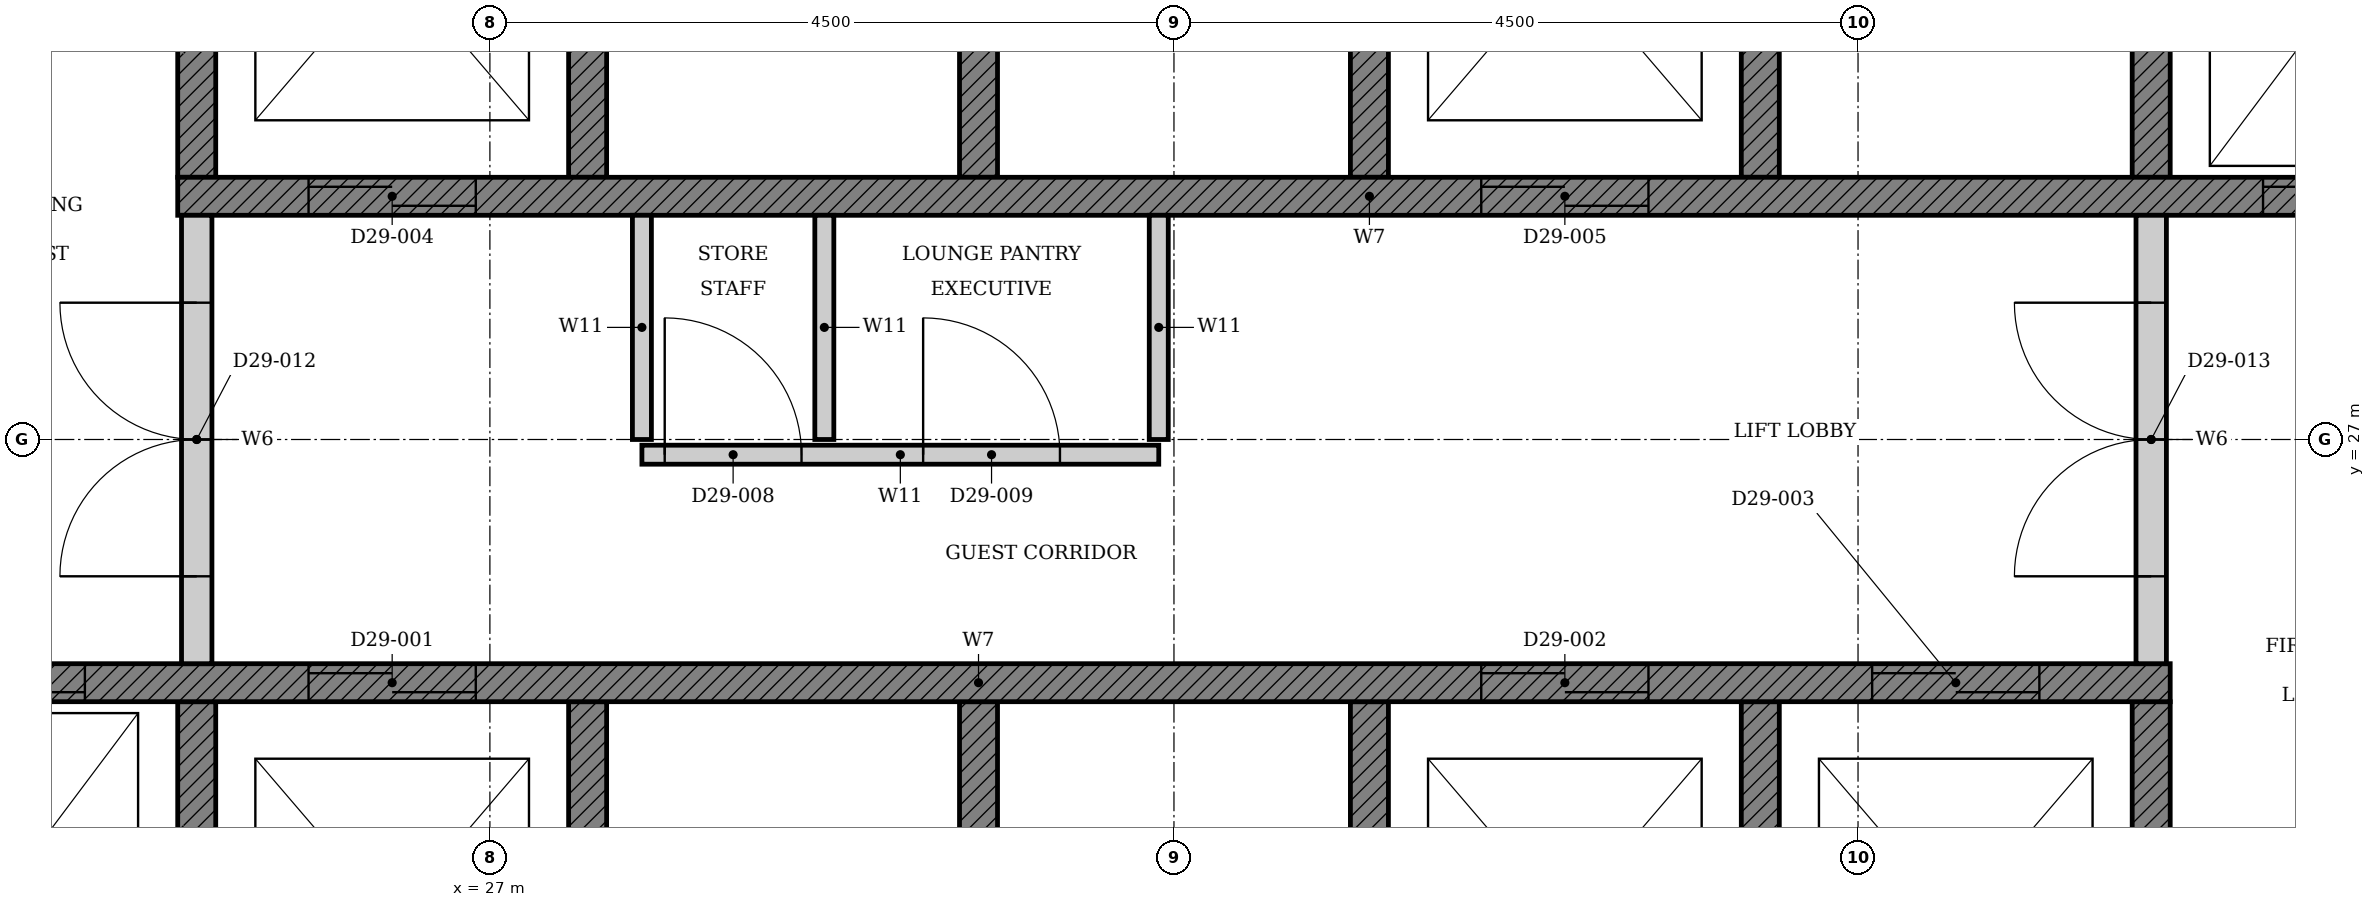
"""IFC4 building model, lengths in metres.
Left out: names, types, materials, properties, quantities, classifications, styles, units other than length and angle.
Written with IfcOpenShell. Run it as: python <this file> out.ifc"""

import sys

from ifc_helpers import new_model, si_unit, direction, frame, frame_2d, origin, place, context, subcontext, project, spatial, polyline, rectangle, outline, extrude, element, fill, save


model = new_model("IFC4")
c1 = context("Model", 3, precision=1e-05, world=origin(), true_north=direction((0.0, 1.0)))
c2 = subcontext(c1, "Body", "Model", "MODEL_VIEW")
j1 = project(units=[si_unit("LENGTHUNIT", "METRE"), si_unit("PLANEANGLEUNIT", "RADIAN")], contexts=[c1])
p1 = place(None, origin())
s1 = spatial("IfcSite", under=j1, at=p1, CompositionType="ELEMENT")
p2 = place(p1, origin())
s2 = spatial("IfcBuilding", under=s1, at=p2, CompositionType="ELEMENT")
p3 = place(p2, frame((0.0, 0.0, 118.8)))
s3 = spatial("IfcBuildingStorey", under=s2, at=p3, CompositionType="ELEMENT", Elevation=118.8)
p4 = place(p3, origin())
e1 = element("IfcWall", 1, at=p4, inside=s3, PredefinedType="SHEAR", context=c2, shape_type="SweptSolid", body=[
    extrude(outline(polyline([(22.375, 22.35), (38.053, 22.35), (38.053, 25.275), (37.803, 25.275), (37.803, 22.65), (35.482, 22.65), (35.482, 25.275), (35.232, 25.275), (35.232, 22.65), (32.911, 22.65), (32.911, 25.275), (32.661, 25.275), (32.661, 22.65), (30.339, 22.65), (30.339, 25.275), (30.089, 25.275), (30.089, 22.65), (27.768, 22.65), (27.768, 25.275), (27.518, 25.275), (27.518, 22.65), (25.197, 22.65), (25.197, 25.275), (24.947, 25.275), (24.947, 22.65), (22.625, 22.65), (22.625, 25.275), (22.375, 25.275), (22.375, 22.35)])), origin(), (0.0, 0.0, 1.0), 3.3),
])
p5 = place(p3, origin())
e2 = element("IfcWall", 2, at=p5, inside=s3, PredefinedType="SHEAR", context=c2, shape_type="SweptSolid", body=[
    extrude(outline(polyline([(24.947, 28.725), (25.197, 28.725), (25.197, 31.35), (27.518, 31.35), (27.518, 28.725), (27.768, 28.725), (27.768, 31.35), (30.089, 31.35), (30.089, 28.725), (30.339, 28.725), (30.339, 31.35), (32.661, 31.35), (32.661, 28.725), (32.911, 28.725), (32.911, 31.35), (35.232, 31.35), (35.232, 28.725), (35.482, 28.725), (35.482, 31.35), (37.803, 31.35), (37.803, 28.725), (38.053, 28.725), (38.053, 31.35), (40.375, 31.35), (40.375, 28.725), (40.625, 28.725), (40.625, 31.65), (24.947, 31.65), (24.947, 28.725)])), origin(), (0.0, 0.0, 1.0), 3.3),
])
p6 = place(p3, frame((22.375, 25.4, 0.0), z_axis=(0.0, 0.0, 1.0), x_axis=(1.0, 0.0, 0.0)))
e3 = element("IfcWall", 3, at=p6, inside=s3, PredefinedType="SHEAR", context=c2, shape_type="SweptSolid", body=[
    extrude(rectangle(XDim=15.678, YDim=0.25, at=frame_2d((7.839, 0.0))), origin(), (0.0, 0.0, 1.0), 3.3),
])
p7 = place(p6, frame((3.432, 0.0, 0.0)))
e4 = element("IfcOpeningElement", 4, at=p7, cuts=e3, PredefinedType="OPENING", context=c2, shape_type="SweptSolid", body=[
    extrude(rectangle(XDim=1.1, YDim=2.1, at=frame_2d((0.55, 1.05))), frame((0.0, 0.135, 0.0), z_axis=(0.0, -1.0, 0.0), x_axis=(1.0, 0.0, 0.0)), (0.0, 0.0, 1.0), 0.27),
])
p8 = place(p6, frame((11.146, 0.0, 0.0)))
e5 = element("IfcOpeningElement", 5, at=p8, cuts=e3, PredefinedType="OPENING", context=c2, shape_type="SweptSolid", body=[
    extrude(rectangle(XDim=1.1, YDim=2.1, at=frame_2d((0.55, 1.05))), frame((0.0, 0.135, 0.0), z_axis=(0.0, -1.0, 0.0), x_axis=(1.0, 0.0, 0.0)), (0.0, 0.0, 1.0), 0.27),
])
p9 = place(p6, frame((13.718, 0.0, 0.0)))
e6 = element("IfcOpeningElement", 6, at=p9, cuts=e3, PredefinedType="OPENING", context=c2, shape_type="SweptSolid", body=[
    extrude(rectangle(XDim=1.1, YDim=2.1, at=frame_2d((0.55, 1.05))), frame((0.0, 0.135, 0.0), z_axis=(0.0, -1.0, 0.0), x_axis=(1.0, 0.0, 0.0)), (0.0, 0.0, 1.0), 0.27),
])
p10 = place(p6, frame((0.861, 0.0, 0.0)))
e7 = element("IfcOpeningElement", 7, at=p10, cuts=e3, PredefinedType="OPENING", context=c2, shape_type="SweptSolid", body=[
    extrude(rectangle(XDim=1.1, YDim=2.1, at=frame_2d((0.55, 1.05))), frame((0.0, 0.135, 0.0), z_axis=(0.0, -1.0, 0.0), x_axis=(1.0, 0.0, 0.0)), (0.0, 0.0, 1.0), 0.27),
])
p11 = place(p3, frame((24.947, 28.6, 0.0), z_axis=(0.0, 0.0, 1.0), x_axis=(1.0, 0.0, 0.0)))
e8 = element("IfcWall", 8, at=p11, inside=s3, PredefinedType="SHEAR", context=c2, shape_type="SweptSolid", body=[
    extrude(rectangle(XDim=15.678, YDim=0.25, at=frame_2d((7.839, 0.0))), origin(), (0.0, 0.0, 1.0), 3.3),
])
p12 = place(p11, frame((0.861, 0.0, 0.0)))
e9 = element("IfcOpeningElement", 9, at=p12, cuts=e8, PredefinedType="OPENING", context=c2, shape_type="SweptSolid", body=[
    extrude(rectangle(XDim=1.1, YDim=2.1, at=frame_2d((0.55, 1.05))), frame((0.0, 0.135, 0.0), z_axis=(0.0, -1.0, 0.0), x_axis=(1.0, 0.0, 0.0)), (0.0, 0.0, 1.0), 0.27),
])
p13 = place(p11, frame((8.575, 0.0, 0.0)))
e10 = element("IfcOpeningElement", 10, at=p13, cuts=e8, PredefinedType="OPENING", context=c2, shape_type="SweptSolid", body=[
    extrude(rectangle(XDim=1.1, YDim=2.1, at=frame_2d((0.55, 1.05))), frame((0.0, 0.135, 0.0), z_axis=(0.0, -1.0, 0.0), x_axis=(1.0, 0.0, 0.0)), (0.0, 0.0, 1.0), 0.27),
])
p14 = place(p11, frame((13.718, 0.0, 0.0)))
e11 = element("IfcOpeningElement", 11, at=p14, cuts=e8, PredefinedType="OPENING", context=c2, shape_type="SweptSolid", body=[
    extrude(rectangle(XDim=1.1, YDim=2.1, at=frame_2d((0.55, 1.05))), frame((0.0, 0.135, 0.0), z_axis=(0.0, -1.0, 0.0), x_axis=(1.0, 0.0, 0.0)), (0.0, 0.0, 1.0), 0.27),
])
p15 = place(p3, frame((28.0, 26.9, 0.0), z_axis=(0.0, 0.0, 1.0), x_axis=(1.0, 0.0, 0.0)))
e12 = element("IfcWall", 12, at=p15, inside=s3, PredefinedType="PARTITIONING", context=c2, shape_type="SweptSolid", body=[
    extrude(rectangle(XDim=3.4, YDim=0.125, at=frame_2d((1.7, 0.0))), origin(), (0.0, 0.0, 1.0), 3.3),
])
p16 = place(p15, frame((0.15, 0.0, 0.0)))
e13 = element("IfcOpeningElement", 13, at=p16, cuts=e12, PredefinedType="OPENING", context=c2, shape_type="SweptSolid", body=[
    extrude(rectangle(XDim=0.9, YDim=2.1, at=frame_2d((0.45, 1.05))), frame((0.0, 0.073, 0.0), z_axis=(0.0, -1.0, 0.0), x_axis=(1.0, 0.0, 0.0)), (0.0, 0.0, 1.0), 0.145),
])
p17 = place(p15, frame((1.85, 0.0, 0.0)))
e14 = element("IfcOpeningElement", 14, at=p17, cuts=e12, PredefinedType="OPENING", context=c2, shape_type="SweptSolid", body=[
    extrude(rectangle(XDim=0.9, YDim=2.1, at=frame_2d((0.45, 1.05))), frame((0.0, 0.073, 0.0), z_axis=(0.0, -1.0, 0.0), x_axis=(1.0, 0.0, 0.0)), (0.0, 0.0, 1.0), 0.145),
])
for number, where, z_axis, x_axis in (
    (15, (28.0, 28.475, 0.0), (0.0, 0.0, 1.0), (0.0, -1.0, 0.0)),
    (16, (29.2, 28.475, 0.0), (0.0, 0.0, 1.0), (0.0, -1.0, 0.0)),
    (17, (31.4, 28.475, 0.0), (0.0, 0.0, 1.0), (0.0, -1.0, 0.0)),
):
    element("IfcWall", number, at=place(p3, frame(where, z_axis=z_axis, x_axis=x_axis)), inside=s3, PredefinedType="PARTITIONING", context=c2, shape_type="SweptSolid", body=[
        extrude(rectangle(XDim=1.475, YDim=0.125, at=frame_2d((0.738, 0.0))), origin(), (0.0, 0.0, 1.0), 3.3),
    ])
p18 = place(p3, frame((25.072, 25.525, 0.0), z_axis=(0.0, 0.0, 1.0), x_axis=(0.0, 1.0, 0.0)))
e18 = element("IfcWall", 18, at=p18, inside=s3, PredefinedType="PARTITIONING", context=c2, shape_type="SweptSolid", body=[
    extrude(rectangle(XDim=2.95, YDim=0.2, at=frame_2d((1.475, 0.0))), origin(), (0.0, 0.0, 1.0), 3.3),
])
p19 = place(p18, frame((0.575, 0.0, 0.0)))
e19 = element("IfcOpeningElement", 19, at=p19, cuts=e18, PredefinedType="OPENING", context=c2, shape_type="SweptSolid", body=[
    extrude(rectangle(XDim=1.8, YDim=2.1, at=frame_2d((0.9, 1.05))), frame((0.0, 0.11, 0.0), z_axis=(0.0, -1.0, 0.0), x_axis=(1.0, 0.0, 0.0)), (0.0, 0.0, 1.0), 0.22),
])
p20 = place(p3, frame((37.928, 25.525, 0.0), z_axis=(0.0, 0.0, 1.0), x_axis=(0.0, 1.0, 0.0)))
e20 = element("IfcWall", 20, at=p20, inside=s3, PredefinedType="PARTITIONING", context=c2, shape_type="SweptSolid", body=[
    extrude(rectangle(XDim=2.95, YDim=0.2, at=frame_2d((1.475, 0.0))), origin(), (0.0, 0.0, 1.0), 3.3),
])
p21 = place(p20, frame((0.575, 0.0, 0.0)))
e21 = element("IfcOpeningElement", 21, at=p21, cuts=e20, PredefinedType="OPENING", context=c2, shape_type="SweptSolid", body=[
    extrude(rectangle(XDim=1.8, YDim=2.1, at=frame_2d((0.9, 1.05))), frame((0.0, 0.11, 0.0), z_axis=(0.0, -1.0, 0.0), x_axis=(1.0, 0.0, 0.0)), (0.0, 0.0, 1.0), 0.22),
])
p22 = place(p7, origin())
e22 = element("IfcDoor", 22, at=p22, inside=s3, OperationType="DOUBLE_DOOR_SLIDING", PredefinedType="DOOR", context=c2, shape_type="SweptSolid", body=[
    extrude(rectangle(XDim=1.1, YDim=2.1, at=frame_2d((0.55, 1.05))), frame((0.0, 0.025, 0.0), z_axis=(0.0, -1.0, 0.0), x_axis=(1.0, 0.0, 0.0)), (0.0, 0.0, 1.0), 0.05),
])
fill(e4, e22)
p23 = place(p8, origin())
e23 = element("IfcDoor", 23, at=p23, inside=s3, OperationType="DOUBLE_DOOR_SLIDING", PredefinedType="DOOR", context=c2, shape_type="SweptSolid", body=[
    extrude(rectangle(XDim=1.1, YDim=2.1, at=frame_2d((0.55, 1.05))), frame((0.0, 0.025, 0.0), z_axis=(0.0, -1.0, 0.0), x_axis=(1.0, 0.0, 0.0)), (0.0, 0.0, 1.0), 0.05),
])
fill(e5, e23)
p24 = place(p9, origin())
e24 = element("IfcDoor", 24, at=p24, inside=s3, OperationType="DOUBLE_DOOR_SLIDING", PredefinedType="DOOR", context=c2, shape_type="SweptSolid", body=[
    extrude(rectangle(XDim=1.1, YDim=2.1, at=frame_2d((0.55, 1.05))), frame((0.0, 0.025, 0.0), z_axis=(0.0, -1.0, 0.0), x_axis=(1.0, 0.0, 0.0)), (0.0, 0.0, 1.0), 0.05),
])
fill(e6, e24)
p25 = place(p12, origin())
e25 = element("IfcDoor", 25, at=p25, inside=s3, OperationType="DOUBLE_DOOR_SLIDING", PredefinedType="DOOR", context=c2, shape_type="SweptSolid", body=[
    extrude(rectangle(XDim=1.1, YDim=2.1, at=frame_2d((0.55, 1.05))), frame((0.0, 0.025, 0.0), z_axis=(0.0, -1.0, 0.0), x_axis=(1.0, 0.0, 0.0)), (0.0, 0.0, 1.0), 0.05),
])
fill(e9, e25)
p26 = place(p13, origin())
e26 = element("IfcDoor", 26, at=p26, inside=s3, OperationType="DOUBLE_DOOR_SLIDING", PredefinedType="DOOR", context=c2, shape_type="SweptSolid", body=[
    extrude(rectangle(XDim=1.1, YDim=2.1, at=frame_2d((0.55, 1.05))), frame((0.0, 0.025, 0.0), z_axis=(0.0, -1.0, 0.0), x_axis=(1.0, 0.0, 0.0)), (0.0, 0.0, 1.0), 0.05),
])
fill(e10, e26)
p27 = place(p10, origin())
e27 = element("IfcDoor", 27, at=p27, inside=s3, OperationType="DOUBLE_DOOR_SLIDING", PredefinedType="DOOR", context=c2, shape_type="SweptSolid", body=[
    extrude(rectangle(XDim=1.1, YDim=2.1, at=frame_2d((0.55, 1.05))), frame((0.0, 0.025, 0.0), z_axis=(0.0, -1.0, 0.0), x_axis=(1.0, 0.0, 0.0)), (0.0, 0.0, 1.0), 0.05),
])
fill(e7, e27)
p28 = place(p14, origin())
e28 = element("IfcDoor", 28, at=p28, inside=s3, OperationType="DOUBLE_DOOR_SLIDING", PredefinedType="DOOR", context=c2, shape_type="SweptSolid", body=[
    extrude(rectangle(XDim=1.1, YDim=2.1, at=frame_2d((0.55, 1.05))), frame((0.0, 0.025, 0.0), z_axis=(0.0, -1.0, 0.0), x_axis=(1.0, 0.0, 0.0)), (0.0, 0.0, 1.0), 0.05),
])
fill(e11, e28)
p29 = place(p16, origin())
e29 = element("IfcDoor", 29, at=p29, inside=s3, OperationType="SINGLE_SWING_LEFT", PredefinedType="DOOR", context=c2, shape_type="SweptSolid", body=[
    extrude(rectangle(XDim=0.9, YDim=2.1, at=frame_2d((0.45, 1.05))), frame((0.0, 0.025, 0.0), z_axis=(0.0, -1.0, 0.0), x_axis=(1.0, 0.0, 0.0)), (0.0, 0.0, 1.0), 0.05),
])
fill(e13, e29)
p30 = place(p17, origin())
e30 = element("IfcDoor", 30, at=p30, inside=s3, OperationType="SINGLE_SWING_LEFT", PredefinedType="DOOR", context=c2, shape_type="SweptSolid", body=[
    extrude(rectangle(XDim=0.9, YDim=2.1, at=frame_2d((0.45, 1.05))), frame((0.0, 0.025, 0.0), z_axis=(0.0, -1.0, 0.0), x_axis=(1.0, 0.0, 0.0)), (0.0, 0.0, 1.0), 0.05),
])
fill(e14, e30)
p31 = place(p19, origin())
e31 = element("IfcDoor", 31, at=p31, inside=s3, OperationType="DOUBLE_DOOR_SINGLE_SWING", PredefinedType="DOOR", context=c2, shape_type="SweptSolid", body=[
    extrude(rectangle(XDim=1.8, YDim=2.1, at=frame_2d((0.9, 1.05))), frame((0.0, 0.025, 0.0), z_axis=(0.0, -1.0, 0.0), x_axis=(1.0, 0.0, 0.0)), (0.0, 0.0, 1.0), 0.05),
])
fill(e19, e31)
p32 = place(p21, origin())
e32 = element("IfcDoor", 32, at=p32, inside=s3, OperationType="DOUBLE_DOOR_SINGLE_SWING", PredefinedType="DOOR", context=c2, shape_type="SweptSolid", body=[
    extrude(rectangle(XDim=1.8, YDim=2.1, at=frame_2d((0.9, 1.05))), frame((0.0, 0.025, 0.0), z_axis=(0.0, -1.0, 0.0), x_axis=(1.0, 0.0, 0.0)), (0.0, 0.0, 1.0), 0.05),
])
fill(e21, e32)
save(model, sys.argv[1])
